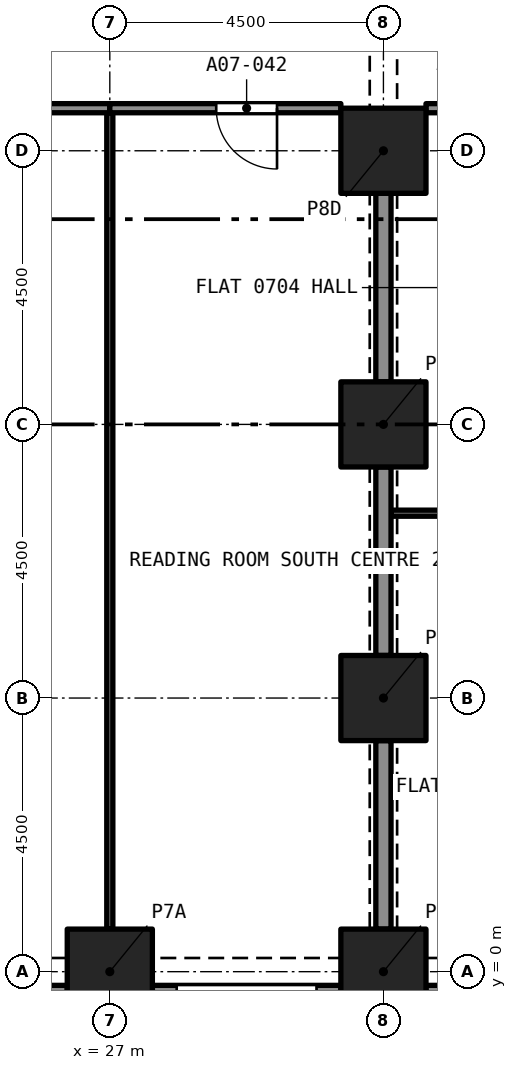
"""IFC4 building model, lengths in metres.
Left out: names, types, materials, properties, quantities, classifications, styles, units other than length and angle.
Written with IfcOpenShell. Run it as: python <this file> out.ifc"""

import sys

from ifc_helpers import new_model, si_unit, direction, frame, frame_2d, origin, origin_2d, place, context, subcontext, project, spatial, rectangle, extrude, element, fill, save


model = new_model("IFC4")
c1 = context("Model", 3, precision=1e-05, world=origin(), true_north=direction((0.0, 1.0)))
c2 = subcontext(c1, "Body", "Model", "MODEL_VIEW")
j1 = project(units=[si_unit("LENGTHUNIT", "METRE"), si_unit("PLANEANGLEUNIT", "RADIAN")], contexts=[c1])
p1 = place(None, origin())
s1 = spatial("IfcSite", under=j1, at=p1, CompositionType="ELEMENT")
p2 = place(p1, origin())
s2 = spatial("IfcBuilding", under=s1, at=p2, CompositionType="ELEMENT")
p3 = place(p2, frame((0.0, 0.0, 33.6)))
s3 = spatial("IfcBuildingStorey", under=s2, at=p3, CompositionType="ELEMENT", Elevation=33.6)
for number, where, z_axis, x_axis in (
    (1, (27.0, 0.0, 0.0), (0.0, 0.0, 1.0), (1.0, 0.0, 0.0)),
    (2, (31.5, 0.0, 0.0), (0.0, 0.0, 1.0), (1.0, 0.0, 0.0)),
    (3, (31.5, 4.5, 0.0), (0.0, 0.0, 1.0), (1.0, 0.0, 0.0)),
    (4, (31.5, 9.0, 0.0), (0.0, 0.0, 1.0), (1.0, 0.0, 0.0)),
    (5, (31.5, 13.5, 0.0), (0.0, 0.0, 1.0), (1.0, 0.0, 0.0)),
):
    element("IfcColumn", number, at=place(p3, frame(where, z_axis=z_axis, x_axis=x_axis)), inside=s3, PredefinedType="COLUMN", context=c2, shape_type="SweptSolid", body=[
        extrude(rectangle(XDim=1.4, YDim=1.4, at=origin_2d()), origin(), (0.0, 0.0, 1.0), 3.2),
    ])
p4 = place(p3, frame((26.3, -0.375, 0.0), z_axis=(0.0, 0.0, 1.0), x_axis=(-1.0, 0.0, 0.0)))
e6 = element("IfcWall", 6, at=p4, inside=s3, PredefinedType="SOLIDWALL", context=c2, shape_type="SweptSolid", body=[
    extrude(rectangle(XDim=3.1, YDim=0.3, at=frame_2d((1.55, 0.0))), origin(), (0.0, 0.0, 1.0), 3.2),
])
p5 = place(p4, frame((0.4, 0.0, 0.45)))
e7 = element("IfcOpeningElement", 7, at=p5, cuts=e6, PredefinedType="OPENING", context=c2, shape_type="SweptSolid", body=[
    extrude(rectangle(XDim=2.3, YDim=1.95, at=frame_2d((1.15, 0.975))), frame((0.0, 0.16, 0.0), z_axis=(0.0, -1.0, 0.0), x_axis=(1.0, 0.0, 0.0)), (0.0, 0.0, 1.0), 0.32),
])
p6 = place(p3, frame((30.8, -0.375, 0.0), z_axis=(0.0, 0.0, 1.0), x_axis=(-1.0, 0.0, 0.0)))
e8 = element("IfcWall", 8, at=p6, inside=s3, PredefinedType="SOLIDWALL", context=c2, shape_type="SweptSolid", body=[
    extrude(rectangle(XDim=3.1, YDim=0.3, at=frame_2d((1.55, 0.0))), origin(), (0.0, 0.0, 1.0), 3.2),
])
p7 = place(p6, frame((0.4, 0.0, 0.45)))
e9 = element("IfcOpeningElement", 9, at=p7, cuts=e8, PredefinedType="OPENING", context=c2, shape_type="SweptSolid", body=[
    extrude(rectangle(XDim=2.3, YDim=1.95, at=frame_2d((1.15, 0.975))), frame((0.0, 0.16, 0.0), z_axis=(0.0, -1.0, 0.0), x_axis=(1.0, 0.0, 0.0)), (0.0, 0.0, 1.0), 0.32),
])
p8 = place(p3, frame((35.3, -0.375, 0.0), z_axis=(0.0, 0.0, 1.0), x_axis=(-1.0, 0.0, 0.0)))
e10 = element("IfcWall", 10, at=p8, inside=s3, PredefinedType="SOLIDWALL", context=c2, shape_type="SweptSolid", body=[
    extrude(rectangle(XDim=3.1, YDim=0.3, at=frame_2d((1.55, 0.0))), origin(), (0.0, 0.0, 1.0), 3.2),
])
p9 = place(p8, frame((0.4, 0.0, 0.45)))
e11 = element("IfcOpeningElement", 11, at=p9, cuts=e10, PredefinedType="OPENING", context=c2, shape_type="SweptSolid", body=[
    extrude(rectangle(XDim=2.3, YDim=1.95, at=frame_2d((1.15, 0.975))), frame((0.0, 0.16, 0.0), z_axis=(0.0, -1.0, 0.0), x_axis=(1.0, 0.0, 0.0)), (0.0, 0.0, 1.0), 0.32),
])
p10 = place(p3, frame((36.0, 7.54, 0.0), z_axis=(0.0, 0.0, 1.0), x_axis=(-1.0, 0.0, 0.0)))
e12 = element("IfcWall", 12, at=p10, inside=s3, PredefinedType="PARTITIONING", context=c2, shape_type="SweptSolid", body=[
    extrude(rectangle(XDim=4.375, YDim=0.1, at=frame_2d((2.188, 0.0))), origin(), (0.0, 0.0, 1.0), 2.9),
])
p11 = place(p10, frame((1.75, 0.0, 0.0)))
e13 = element("IfcOpeningElement", 13, at=p11, cuts=e12, PredefinedType="OPENING", context=c2, shape_type="SweptSolid", body=[
    extrude(rectangle(XDim=1.0, YDim=2.1, at=frame_2d((0.5, 1.05))), frame((0.0, 0.06, 0.0), z_axis=(0.0, -1.0, 0.0), x_axis=(1.0, 0.0, 0.0)), (0.0, 0.0, 1.0), 0.12),
])
p12 = place(p3, frame((31.5, 9.7, 0.0), z_axis=(0.0, 0.0, 1.0), x_axis=(0.0, 1.0, 0.0)))
e14 = element("IfcWall", 14, at=p12, inside=s3, PredefinedType="PARTITIONING", context=c2, shape_type="SweptSolid", body=[
    extrude(rectangle(XDim=3.1, YDim=0.25, at=frame_2d((1.55, 0.0))), origin(), (0.0, 0.0, 1.0), 2.38),
])
p13 = place(p3, frame((34.425, 14.2, 0.0), z_axis=(0.0, 0.0, 1.0), x_axis=(-1.0, 0.0, 0.0)))
e15 = element("IfcWall", 15, at=p13, inside=s3, PredefinedType="PARTITIONING", context=c2, shape_type="SweptSolid", body=[
    extrude(rectangle(XDim=2.225, YDim=0.15, at=frame_2d((1.113, 0.0))), origin(), (0.0, 0.0, 1.0), 2.9),
])
p14 = place(p13, frame((0.175, 0.0, 0.0)))
e16 = element("IfcOpeningElement", 16, at=p14, cuts=e15, PredefinedType="OPENING", context=c2, shape_type="SweptSolid", body=[
    extrude(rectangle(XDim=1.0, YDim=2.1, at=frame_2d((0.5, 1.05))), frame((0.0, 0.085, 0.0), z_axis=(0.0, -1.0, 0.0), x_axis=(1.0, 0.0, 0.0)), (0.0, 0.0, 1.0), 0.17),
])
for number, where, z_axis, x_axis in (
    (17, (31.5, 0.7, 0.0), (0.0, 0.0, 1.0), (0.0, 1.0, 0.0)),
    (18, (31.5, 5.2, 0.0), (0.0, 0.0, 1.0), (0.0, 1.0, 0.0)),
):
    element("IfcWall", number, at=place(p3, frame(where, z_axis=z_axis, x_axis=x_axis)), inside=s3, PredefinedType="PARTITIONING", context=c2, shape_type="SweptSolid", body=[
        extrude(rectangle(XDim=3.1, YDim=0.25, at=frame_2d((1.55, 0.0))), origin(), (0.0, 0.0, 1.0), 2.38),
    ])
p15 = place(p3, frame((27.0, 0.7, 0.0), z_axis=(0.0, 0.0, 1.0), x_axis=(0.0, 1.0, 0.0)))
e19 = element("IfcWall", 19, at=p15, inside=s3, PredefinedType="PARTITIONING", context=c2, shape_type="SweptSolid", body=[
    extrude(rectangle(XDim=13.425, YDim=0.1, at=frame_2d((6.712, 0.0))), origin(), (0.0, 0.0, 1.0), 2.75),
])
p16 = place(p3, frame((27.0, 14.2, 0.0), z_axis=(0.0, 0.0, 1.0), x_axis=(-1.0, 0.0, 0.0)))
e20 = element("IfcWall", 20, at=p16, inside=s3, PredefinedType="PARTITIONING", context=c2, shape_type="SweptSolid", body=[
    extrude(rectangle(XDim=4.5, YDim=0.15, at=frame_2d((2.25, 0.0))), origin(), (0.0, 0.0, 1.0), 2.75),
])
p17 = place(p16, frame((1.75, 0.0, 0.0)))
e21 = element("IfcOpeningElement", 21, at=p17, cuts=e20, PredefinedType="OPENING", context=c2, shape_type="SweptSolid", body=[
    extrude(rectangle(XDim=1.0, YDim=2.1, at=frame_2d((0.5, 1.05))), frame((0.0, 0.085, 0.0), z_axis=(0.0, -1.0, 0.0), x_axis=(1.0, 0.0, 0.0)), (0.0, 0.0, 1.0), 0.17),
])
p18 = place(p3, frame((30.8, 14.2, 0.0), z_axis=(0.0, 0.0, 1.0), x_axis=(-1.0, 0.0, 0.0)))
e22 = element("IfcWall", 22, at=p18, inside=s3, PredefinedType="PARTITIONING", context=c2, shape_type="SweptSolid", body=[
    extrude(rectangle(XDim=3.8, YDim=0.15, at=frame_2d((1.9, 0.0))), origin(), (0.0, 0.0, 1.0), 2.75),
])
p19 = place(p18, frame((1.05, 0.0, 0.0)))
e23 = element("IfcOpeningElement", 23, at=p19, cuts=e22, PredefinedType="OPENING", context=c2, shape_type="SweptSolid", body=[
    extrude(rectangle(XDim=1.0, YDim=2.1, at=frame_2d((0.5, 1.05))), frame((0.0, 0.085, 0.0), z_axis=(0.0, -1.0, 0.0), x_axis=(1.0, 0.0, 0.0)), (0.0, 0.0, 1.0), 0.17),
])
p20 = place(p19, origin())
e24 = element("IfcDoor", 24, at=p20, inside=s3, OperationType="SINGLE_SWING_LEFT", PredefinedType="DOOR", context=c2, shape_type="SweptSolid", body=[
    extrude(rectangle(XDim=1.0, YDim=2.1, at=frame_2d((0.5, 1.05))), frame((0.0, 0.025, 0.0), z_axis=(0.0, -1.0, 0.0), x_axis=(1.0, 0.0, 0.0)), (0.0, 0.0, 1.0), 0.05),
])
fill(e23, e24)
save(model, sys.argv[1])
